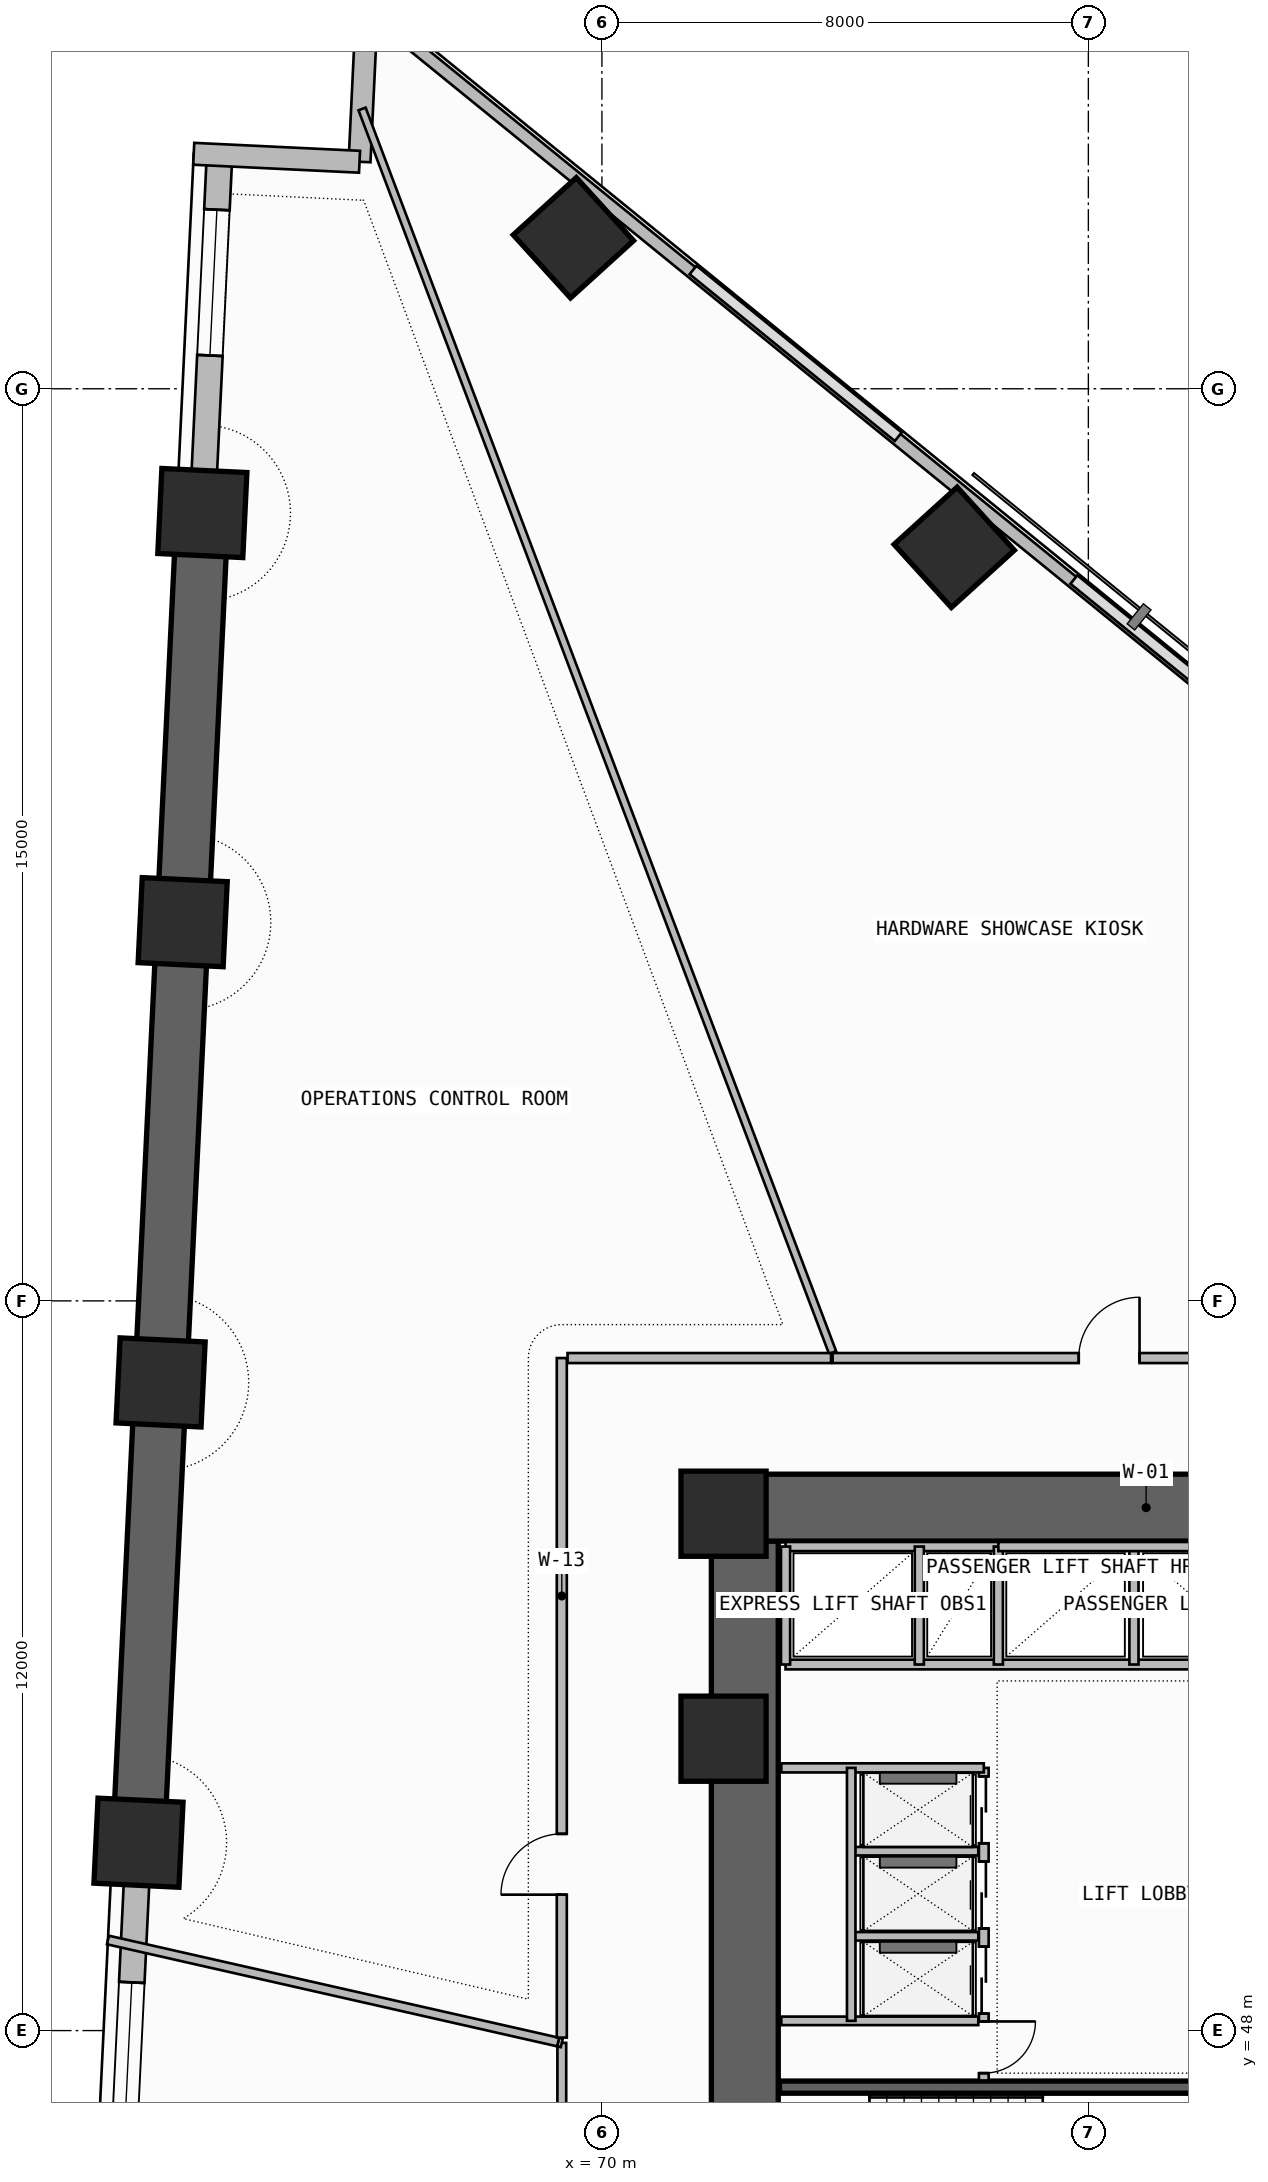
"""IFC4 building model, lengths in metres.
Left out: names, types, materials, properties, quantities, classifications, styles, units other than length and angle.
Written with IfcOpenShell. Run it as: python <this file> out.ifc"""

import sys

from ifc_helpers import new_model, si_unit, direction, frame, frame_2d, origin, origin_2d, place, context, subcontext, project, spatial, rectangle, extrude, element, fill, save


model = new_model("IFC4")
c1 = context("Model", 3, precision=1e-05, world=origin(), true_north=direction((0.0, 1.0)))
c2 = subcontext(c1, "Body", "Model", "MODEL_VIEW")
j1 = project(units=[si_unit("LENGTHUNIT", "METRE"), si_unit("PLANEANGLEUNIT", "RADIAN")], contexts=[c1])
p1 = place(None, origin())
s1 = spatial("IfcSite", under=j1, at=p1, CompositionType="ELEMENT")
p2 = place(p1, origin())
s2 = spatial("IfcBuilding", under=s1, at=p2, CompositionType="ELEMENT")
p3 = place(p2, frame((0.0, 0.0, 44.7)))
s3 = spatial("IfcBuildingStorey", under=s2, at=p3, CompositionType="ELEMENT", Elevation=44.7)
p4 = place(p3, frame((72.35, 43.35, -0.2), z_axis=(0.0, 0.0, 1.0), x_axis=(0.0, 1.0, 0.0)))
e1 = element("IfcWall", 1, at=p4, inside=s3, PredefinedType="SHEAR", context=c2, shape_type="SweptSolid", body=[
    extrude(rectangle(XDim=12.7, YDim=1.1, at=frame_2d((6.35, 0.0))), origin(), (0.0, 0.0, 1.0), 3.54),
])
p5 = place(p4, frame((1.35, 0.0, 0.2)))
e2 = element("IfcOpeningElement", 2, at=p5, cuts=e1, PredefinedType="OPENING", context=c2, shape_type="SweptSolid", body=[
    extrude(rectangle(XDim=1.2, YDim=2.2, at=frame_2d((0.6, 1.1))), frame((0.0, 0.56, 0.0), z_axis=(0.0, -1.0, 0.0), x_axis=(1.0, 0.0, 0.0)), (0.0, 0.0, 1.0), 1.12),
])
p6 = place(p3, frame((71.8, 56.6, -0.2), z_axis=(0.0, 0.0, 1.0), x_axis=(1.0, 0.0, 0.0)))
e3 = element("IfcWall", 3, at=p6, inside=s3, PredefinedType="SHEAR", context=c2, shape_type="SweptSolid", body=[
    extrude(rectangle(XDim=14.3, YDim=1.1, at=frame_2d((7.15, 0.0))), origin(), (0.0, 0.0, 1.0), 3.54),
])
for number, where, z_axis, x_axis in (
    (4, (72.0, 52.8, 0.0), (0.0, 0.0, 1.0), (1.0, 0.0, 0.0)),
    (5, (72.0, 56.5, 0.0), (0.0, 0.0, 1.0), (1.0, 0.0, 0.0)),
    (6, (75.794, 72.392, 0.0), (0.0, 0.0, 1.0), (0.74, 0.672, 0.0)),
    (7, (69.531, 77.483, 0.0), (0.0, 0.0, 1.0), (0.74, 0.672, 0.0)),
    (8, (63.428, 72.957, 0.0), (0.0, 0.0, 1.0), (0.048, 0.999, 0.0)),
    (9, (63.105, 66.228, 0.0), (0.0, 0.0, 1.0), (0.048, 0.999, 0.0)),
    (10, (62.742, 58.659, 0.0), (0.0, 0.0, 1.0), (0.048, 0.999, 0.0)),
    (11, (62.378, 51.09, 0.0), (0.0, 0.0, 1.0), (0.048, 0.999, 0.0)),
):
    element("IfcColumn", number, at=place(p3, frame(where, z_axis=z_axis, x_axis=x_axis)), inside=s3, PredefinedType="COLUMN", context=c2, shape_type="SweptSolid", body=[
        extrude(rectangle(XDim=1.4, YDim=1.4, at=origin_2d()), origin(), (0.0, 0.0, 1.0), 3.6),
    ])
p7 = place(p3, frame((63.711, 78.844, 0.0), z_axis=(0.0, 0.0, 1.0), x_axis=(-0.048007946398, -0.998846953784, 0.0)))
e12 = element("IfcWall", 12, at=p7, inside=s3, PredefinedType="SOLIDWALL", context=c2, shape_type="SweptSolid", body=[
    extrude(rectangle(XDim=5.894, YDim=0.42, at=frame_2d((2.947, 0.0))), origin(), (0.0, 0.0, 1.0), 2.325),
])
p8 = place(p7, frame((0.9, 0.0, 1.2)))
e13 = element("IfcOpeningElement", 13, at=p8, cuts=e12, PredefinedType="OPENING", context=c2, shape_type="SweptSolid", body=[
    extrude(rectangle(XDim=2.4, YDim=0.9, at=frame_2d((1.2, 0.45))), frame((0.0, 0.22, 0.0), z_axis=(0.0, -1.0, 0.0), x_axis=(1.0, 0.0, 0.0)), (0.0, 0.0, 1.0), 0.44),
])
p9 = place(p3, frame((63.428, 72.957, -0.2), z_axis=(0.0, 0.0, 1.0), x_axis=(-0.047976309476, -0.998848473858, 0.0)))
e14 = element("IfcWall", 14, at=p9, inside=s3, PredefinedType="SHEAR", context=c2, shape_type="SweptSolid", body=[
    extrude(rectangle(XDim=21.892, YDim=0.85, at=frame_2d((10.946, 0.0))), origin(), (0.0, 0.0, 1.0), 3.54),
])
p10 = place(p3, frame((62.378, 51.09, 0.0), z_axis=(0.0, 0.0, 1.0), x_axis=(-0.047978424452, -0.99884837227, 0.0)))
e15 = element("IfcWall", 15, at=p10, inside=s3, PredefinedType="SOLIDWALL", context=c2, shape_type="SweptSolid", body=[
    extrude(rectangle(XDim=14.314, YDim=0.42, at=frame_2d((7.157, 0.0))), origin(), (0.0, 0.0, 1.0), 2.325),
])
p11 = place(p10, frame((2.3, 0.0, 1.2)))
e16 = element("IfcOpeningElement", 16, at=p11, cuts=e15, PredefinedType="OPENING", context=c2, shape_type="SweptSolid", body=[
    extrude(rectangle(XDim=2.4, YDim=0.9, at=frame_2d((1.2, 0.45))), frame((0.0, 0.22, 0.0), z_axis=(0.0, -1.0, 0.0), x_axis=(1.0, 0.0, 0.0)), (0.0, 0.0, 1.0), 0.44),
])
for number, where, z_axis, x_axis in (
    (17, (66.144, 81.46, 0.0), (0.0, 0.0, 1.0), (-0.048, -0.999, 0.0)),
    (18, (66.013, 78.733, 0.0), (0.0, 0.0, 1.0), (-0.999, 0.048, 0.0)),
):
    element("IfcWall", number, at=place(p3, frame(where, z_axis=z_axis, x_axis=x_axis)), inside=s3, PredefinedType="SOLIDWALL", context=c2, shape_type="SweptSolid", body=[
        extrude(rectangle(XDim=2.73, YDim=0.36, at=frame_2d((1.365, 0.0))), origin(), (0.0, 0.0, 1.0), 3.34),
    ])
p12 = place(p3, frame((94.513, 58.196, 0.0), z_axis=(0.0, 0.0, 1.0), x_axis=(-0.776001602097, 0.630730935933, 0.0)))
e19 = element("IfcWall", 19, at=p12, inside=s3, PredefinedType="PARAPET", context=c2, shape_type="SweptSolid", body=[
    extrude(rectangle(XDim=36.148, YDim=0.2, at=frame_2d((18.074, 0.0))), origin(), (0.0, 0.0, 1.0), 1.15),
])
p13 = place(p3, frame((72.92, 47.07, -0.2), z_axis=(0.0, 0.0, 1.0), x_axis=(1.0, 0.0, 0.0)))
e20 = element("IfcWall", 20, at=p13, inside=s3, PredefinedType="SOLIDWALL", context=c2, shape_type="SweptSolid", body=[
    extrude(rectangle(XDim=7.7, YDim=0.2, at=frame_2d((3.85, 0.0))), origin(), (0.0, 0.0, 1.0), 3.54),
])
p14 = place(p3, frame((76.28, 47.18, 0.0), z_axis=(0.0, 0.0, 1.0), x_axis=(0.0, 1.0, 0.0)))
e21 = element("IfcWall", 21, at=p14, inside=s3, PredefinedType="SOLIDWALL", context=c2, shape_type="SweptSolid", body=[
    extrude(rectangle(XDim=5.14, YDim=0.16, at=frame_2d((2.57, 0.0))), origin(), (0.0, 0.0, 1.0), 3.34),
])
p15 = place(p14, frame((1.1, 0.0, 0.0)))
e22 = element("IfcOpeningElement", 22, at=p15, cuts=e21, PredefinedType="OPENING", context=c2, shape_type="SweptSolid", body=[
    extrude(rectangle(XDim=1.1, YDim=2.25, at=frame_2d((0.55, 1.125))), frame((0.0, 0.09, 0.0), z_axis=(0.0, -1.0, 0.0), x_axis=(1.0, 0.0, 0.0)), (0.0, 0.0, 1.0), 0.18),
])
p16 = place(p14, frame((2.5, 0.0, 0.0)))
e23 = element("IfcOpeningElement", 23, at=p16, cuts=e21, PredefinedType="OPENING", context=c2, shape_type="SweptSolid", body=[
    extrude(rectangle(XDim=1.1, YDim=2.25, at=frame_2d((0.55, 1.125))), frame((0.0, 0.09, 0.0), z_axis=(0.0, -1.0, 0.0), x_axis=(1.0, 0.0, 0.0)), (0.0, 0.0, 1.0), 0.18),
])
p17 = place(p14, frame((3.9, 0.0, 0.0)))
e24 = element("IfcOpeningElement", 24, at=p17, cuts=e21, PredefinedType="OPENING", context=c2, shape_type="SweptSolid", body=[
    extrude(rectangle(XDim=1.1, YDim=2.25, at=frame_2d((0.55, 1.125))), frame((0.0, 0.09, 0.0), z_axis=(0.0, -1.0, 0.0), x_axis=(1.0, 0.0, 0.0)), (0.0, 0.0, 1.0), 0.18),
])
p18 = place(p14, frame((0.12, 0.0, 0.0)))
e25 = element("IfcOpeningElement", 25, at=p18, cuts=e21, PredefinedType="OPENING", context=c2, shape_type="SweptSolid", body=[
    extrude(rectangle(XDim=0.85, YDim=2.05, at=frame_2d((0.425, 1.025))), frame((0.0, 0.09, 0.0), z_axis=(0.0, -1.0, 0.0), x_axis=(1.0, 0.0, 0.0)), (0.0, 0.0, 1.0), 0.18),
])
p19 = place(p3, frame((72.95, 52.32, 0.0), z_axis=(0.0, 0.0, 1.0), x_axis=(1.0, 0.0, 0.0)))
e26 = element("IfcWall", 26, at=p19, inside=s3, PredefinedType="SOLIDWALL", context=c2, shape_type="SweptSolid", body=[
    extrude(rectangle(XDim=3.33, YDim=0.15, at=frame_2d((1.665, 0.0))), origin(), (0.0, 0.0, 1.0), 3.34),
])
p20 = place(p3, frame((72.95, 48.16, 0.0), z_axis=(0.0, 0.0, 1.0), x_axis=(1.0, 0.0, 0.0)))
e27 = element("IfcWall", 27, at=p20, inside=s3, PredefinedType="PLUMBINGWALL", context=c2, shape_type="SweptSolid", body=[
    extrude(rectangle(XDim=3.24, YDim=0.14, at=frame_2d((1.62, 0.0))), origin(), (0.0, 0.0, 1.0), 3.34),
])
for number, where, z_axis, x_axis in (
    (28, (74.15, 49.55, 0.0), (0.0, 0.0, 1.0), (1.0, 0.0, 0.0)),
    (29, (74.15, 50.95, 0.0), (0.0, 0.0, 1.0), (1.0, 0.0, 0.0)),
):
    element("IfcWall", number, at=place(p3, frame(where, z_axis=z_axis, x_axis=x_axis)), inside=s3, PredefinedType="PLUMBINGWALL", context=c2, shape_type="SweptSolid", body=[
        extrude(rectangle(XDim=2.04, YDim=0.14, at=frame_2d((1.02, 0.0))), origin(), (0.0, 0.0, 1.0), 3.34),
    ])
p21 = place(p3, frame((74.1, 48.16, 0.0), z_axis=(0.0, 0.0, 1.0), x_axis=(0.0, 1.0, 0.0)))
e30 = element("IfcWall", 30, at=p21, inside=s3, PredefinedType="PLUMBINGWALL", context=c2, shape_type="SweptSolid", body=[
    extrude(rectangle(XDim=4.16, YDim=0.14, at=frame_2d((2.08, 0.0))), origin(), (0.0, 0.0, 1.0), 3.34),
])
p22 = place(p3, frame((73.02, 54.02, 0.0), z_axis=(0.0, 0.0, 1.0), x_axis=(1.0, 0.0, 0.0)))
e31 = element("IfcWall", 31, at=p22, inside=s3, PredefinedType="SOLIDWALL", context=c2, shape_type="SweptSolid", body=[
    extrude(rectangle(XDim=12.08, YDim=0.16, at=frame_2d((6.04, 0.0))), origin(), (0.0, 0.0, 1.0), 3.34),
])
p23 = place(p3, frame((73.02, 55.96, 0.0), z_axis=(0.0, 0.0, 1.0), x_axis=(1.0, 0.0, 0.0)))
e32 = element("IfcWall", 32, at=p23, inside=s3, PredefinedType="SOLIDWALL", context=c2, shape_type="SweptSolid", body=[
    extrude(rectangle(XDim=3.5, YDim=0.15, at=frame_2d((1.75, 0.0))), origin(), (0.0, 0.0, 1.0), 3.34),
])
p24 = place(p3, frame((73.02, 54.02, 0.0), z_axis=(0.0, 0.0, 1.0), x_axis=(0.0, 1.0, 0.0)))
e33 = element("IfcWall", 33, at=p24, inside=s3, PredefinedType="PLUMBINGWALL", context=c2, shape_type="SweptSolid", body=[
    extrude(rectangle(XDim=1.94, YDim=0.15, at=frame_2d((0.97, 0.0))), origin(), (0.0, 0.0, 1.0), 3.34),
])
p25 = place(p3, frame((76.52, 54.02, 0.0), z_axis=(0.0, 0.0, 1.0), x_axis=(0.0, 1.0, 0.0)))
e34 = element("IfcWall", 34, at=p25, inside=s3, PredefinedType="SOLIDWALL", context=c2, shape_type="SweptSolid", body=[
    extrude(rectangle(XDim=1.94, YDim=0.15, at=frame_2d((0.97, 0.0))), origin(), (0.0, 0.0, 1.0), 3.34),
])
p26 = place(p3, frame((75.22, 54.02, 0.0), z_axis=(0.0, 0.0, 1.0), x_axis=(0.0, 1.0, 0.0)))
e35 = element("IfcWall", 35, at=p26, inside=s3, PredefinedType="PLUMBINGWALL", context=c2, shape_type="SweptSolid", body=[
    extrude(rectangle(XDim=1.94, YDim=0.15, at=frame_2d((0.97, 0.0))), origin(), (0.0, 0.0, 1.0), 3.34),
])
p27 = place(p3, frame((78.75, 54.02, 0.0), z_axis=(0.0, 0.0, 1.0), x_axis=(0.0, 1.0, 0.0)))
e36 = element("IfcWall", 36, at=p27, inside=s3, PredefinedType="PLUMBINGWALL", context=c2, shape_type="SweptSolid", body=[
    extrude(rectangle(XDim=1.96, YDim=0.15, at=frame_2d((0.98, 0.0))), origin(), (0.0, 0.0, 1.0), 3.34),
])
p28 = place(p3, frame((76.52, 55.96, 0.0), z_axis=(0.0, 0.0, 1.0), x_axis=(1.0, 0.0, 0.0)))
e37 = element("IfcWall", 37, at=p28, inside=s3, PredefinedType="SOLIDWALL", context=c2, shape_type="SweptSolid", body=[
    extrude(rectangle(XDim=6.7, YDim=0.15, at=frame_2d((3.35, 0.0))), origin(), (0.0, 0.0, 1.0), 3.34),
])
p29 = place(p3, frame((69.34, 47.798, 0.0), z_axis=(0.0, 0.0, 1.0), x_axis=(0.0, -1.0, 0.0)))
e38 = element("IfcWall", 38, at=p29, inside=s3, PredefinedType="PARTITIONING", context=c2, shape_type="SweptSolid", body=[
    extrude(rectangle(XDim=3.211, YDim=0.145, at=frame_2d((1.605, 0.0))), origin(), (0.0, 0.0, 1.0), 3.34),
])
p30 = place(p29, frame((1.156, 0.0, 0.0)))
e39 = element("IfcOpeningElement", 39, at=p30, cuts=e38, PredefinedType="OPENING", context=c2, shape_type="SweptSolid", body=[
    extrude(rectangle(XDim=0.9, YDim=2.1, at=frame_2d((0.45, 1.05))), frame((0.0, 0.083, 0.0), z_axis=(0.0, -1.0, 0.0), x_axis=(1.0, 0.0, 0.0)), (0.0, 0.0, 1.0), 0.165),
])
p31 = place(p3, frame((69.28, 47.812, 0.0), z_axis=(0.0, 0.0, 1.0), x_axis=(0.974190578374, -0.225727085233, 0.0)))
e40 = element("IfcWall", 40, at=p31, inside=s3, PredefinedType="PARTITIONING", context=c2, shape_type="SweptSolid", body=[
    extrude(rectangle(XDim=0.062, YDim=0.145, at=frame_2d((0.031, 0.0))), origin(), (0.0, 0.0, 1.0), 3.34),
])
p32 = place(p3, frame((61.875, 49.49, 0.0), z_axis=(0.0, 0.0, 1.0), x_axis=(0.975255899725, -0.221079013143, 0.0)))
e41 = element("IfcWall", 41, at=p32, inside=s3, PredefinedType="PARTITIONING", context=c2, shape_type="SweptSolid", body=[
    extrude(rectangle(XDim=7.592, YDim=0.145, at=frame_2d((3.796, 0.0))), origin(), (0.0, 0.0, 1.0), 3.34),
])
p33 = place(p3, frame((82.89, 59.06, 0.0), z_axis=(0.0, 0.0, 1.0), x_axis=(-1.0, 0.0, 0.0)))
e42 = element("IfcWall", 42, at=p33, inside=s3, PredefinedType="PARTITIONING", context=c2, shape_type="SweptSolid", body=[
    extrude(rectangle(XDim=9.096, YDim=0.165, at=frame_2d((4.548, 0.0))), origin(), (0.0, 0.0, 1.0), 3.34),
])
p34 = place(p33, frame((4.048, 0.0, 0.0)))
e43 = element("IfcOpeningElement", 43, at=p34, cuts=e42, PredefinedType="OPENING", context=c2, shape_type="SweptSolid", body=[
    extrude(rectangle(XDim=1.0, YDim=2.2, at=frame_2d((0.5, 1.1))), frame((0.0, 0.093, 0.0), z_axis=(0.0, -1.0, 0.0), x_axis=(1.0, 0.0, 0.0)), (0.0, 0.0, 1.0), 0.185),
])
p35 = place(p3, frame((73.794, 59.151, 0.0), z_axis=(0.0, 0.0, 1.0), x_axis=(-0.353905559912, 0.935281163428, 0.0)))
e44 = element("IfcWall", 44, at=p35, inside=s3, PredefinedType="PARTITIONING", context=c2, shape_type="SweptSolid", body=[
    extrude(rectangle(XDim=21.866, YDim=0.125, at=frame_2d((10.933, 0.0))), origin(), (0.0, 0.0, 1.0), 2.725),
])
p36 = place(p3, frame((69.34, 59.06, 0.0), z_axis=(0.0, 0.0, 1.0), x_axis=(0.0, -1.0, 0.0)))
e45 = element("IfcWall", 45, at=p36, inside=s3, PredefinedType="PARTITIONING", context=c2, shape_type="SweptSolid", body=[
    extrude(rectangle(XDim=11.176, YDim=0.165, at=frame_2d((5.588, 0.0))), origin(), (0.0, 0.0, 1.0), 2.725),
])
p37 = place(p36, frame((7.825, 0.0, 0.0)))
e46 = element("IfcOpeningElement", 46, at=p37, cuts=e45, PredefinedType="OPENING", context=c2, shape_type="SweptSolid", body=[
    extrude(rectangle(XDim=1.0, YDim=2.2, at=frame_2d((0.5, 1.1))), frame((0.0, 0.093, 0.0), z_axis=(0.0, -1.0, 0.0), x_axis=(1.0, 0.0, 0.0)), (0.0, 0.0, 1.0), 0.185),
])
p38 = place(p3, frame((73.768, 59.06, 0.0), z_axis=(0.0, 0.0, 1.0), x_axis=(-1.0, 0.0, 0.0)))
e47 = element("IfcWall", 47, at=p38, inside=s3, PredefinedType="PARTITIONING", context=c2, shape_type="SweptSolid", body=[
    extrude(rectangle(XDim=4.333, YDim=0.165, at=frame_2d((2.167, 0.0))), origin(), (0.0, 0.0, 1.0), 2.725),
])
p39 = place(p8, origin())
e48 = element("IfcWindow", 48, at=p39, inside=s3, PartitioningType="SINGLE_PANEL", PredefinedType="WINDOW", context=c2, shape_type="SweptSolid", body=[
    extrude(rectangle(XDim=2.4, YDim=0.9, at=frame_2d((1.2, 0.45))), frame((0.0, 0.03, 0.0), z_axis=(0.0, -1.0, 0.0), x_axis=(1.0, 0.0, 0.0)), (0.0, 0.0, 1.0), 0.06),
])
fill(e13, e48)
p40 = place(p11, origin())
e49 = element("IfcWindow", 49, at=p40, inside=s3, PartitioningType="SINGLE_PANEL", PredefinedType="WINDOW", context=c2, shape_type="SweptSolid", body=[
    extrude(rectangle(XDim=2.4, YDim=0.9, at=frame_2d((1.2, 0.45))), frame((0.0, 0.03, 0.0), z_axis=(0.0, -1.0, 0.0), x_axis=(1.0, 0.0, 0.0)), (0.0, 0.0, 1.0), 0.06),
])
fill(e16, e49)
p41 = place(p15, origin())
e50 = element("IfcDoor", 50, at=p41, inside=s3, OperationType="DOUBLE_DOOR_SLIDING", PredefinedType="DOOR", context=c2, shape_type="SweptSolid", body=[
    extrude(rectangle(XDim=1.1, YDim=2.25, at=frame_2d((0.55, 1.125))), frame((0.0, 0.025, 0.0), z_axis=(0.0, -1.0, 0.0), x_axis=(1.0, 0.0, 0.0)), (0.0, 0.0, 1.0), 0.05),
])
fill(e22, e50)
p42 = place(p16, origin())
e51 = element("IfcDoor", 51, at=p42, inside=s3, OperationType="DOUBLE_DOOR_SLIDING", PredefinedType="DOOR", context=c2, shape_type="SweptSolid", body=[
    extrude(rectangle(XDim=1.1, YDim=2.25, at=frame_2d((0.55, 1.125))), frame((0.0, 0.025, 0.0), z_axis=(0.0, -1.0, 0.0), x_axis=(1.0, 0.0, 0.0)), (0.0, 0.0, 1.0), 0.05),
])
fill(e23, e51)
p43 = place(p17, origin())
e52 = element("IfcDoor", 52, at=p43, inside=s3, OperationType="DOUBLE_DOOR_SLIDING", PredefinedType="DOOR", context=c2, shape_type="SweptSolid", body=[
    extrude(rectangle(XDim=1.1, YDim=2.25, at=frame_2d((0.55, 1.125))), frame((0.0, 0.025, 0.0), z_axis=(0.0, -1.0, 0.0), x_axis=(1.0, 0.0, 0.0)), (0.0, 0.0, 1.0), 0.05),
])
fill(e24, e52)
p44 = place(p18, frame((0.85, 0.0, 0.0), z_axis=(0.0, 0.0, 1.0), x_axis=(-1.0, 0.0, 0.0)))
e53 = element("IfcDoor", 53, at=p44, inside=s3, OperationType="SINGLE_SWING_LEFT", PredefinedType="DOOR", context=c2, shape_type="SweptSolid", body=[
    extrude(rectangle(XDim=0.85, YDim=2.05, at=frame_2d((0.425, 1.025))), frame((0.0, 0.025, 0.0), z_axis=(0.0, -1.0, 0.0), x_axis=(1.0, 0.0, 0.0)), (0.0, 0.0, 1.0), 0.05),
])
fill(e25, e53)
p45 = place(p34, frame((1.0, 0.0, 0.0), z_axis=(0.0, 0.0, 1.0), x_axis=(-1.0, 0.0, 0.0)))
e54 = element("IfcDoor", 54, at=p45, inside=s3, OperationType="SINGLE_SWING_RIGHT", PredefinedType="DOOR", context=c2, shape_type="SweptSolid", body=[
    extrude(rectangle(XDim=1.0, YDim=2.2, at=frame_2d((0.5, 1.1))), frame((0.0, 0.025, 0.0), z_axis=(0.0, -1.0, 0.0), x_axis=(1.0, 0.0, 0.0)), (0.0, 0.0, 1.0), 0.05),
])
fill(e43, e54)
p46 = place(p37, frame((1.0, 0.0, 0.0), z_axis=(0.0, 0.0, 1.0), x_axis=(-1.0, 0.0, 0.0)))
e55 = element("IfcDoor", 55, at=p46, inside=s3, OperationType="SINGLE_SWING_LEFT", PredefinedType="DOOR", context=c2, shape_type="SweptSolid", body=[
    extrude(rectangle(XDim=1.0, YDim=2.2, at=frame_2d((0.5, 1.1))), frame((0.0, 0.025, 0.0), z_axis=(0.0, -1.0, 0.0), x_axis=(1.0, 0.0, 0.0)), (0.0, 0.0, 1.0), 0.05),
])
fill(e46, e55)
save(model, sys.argv[1])
